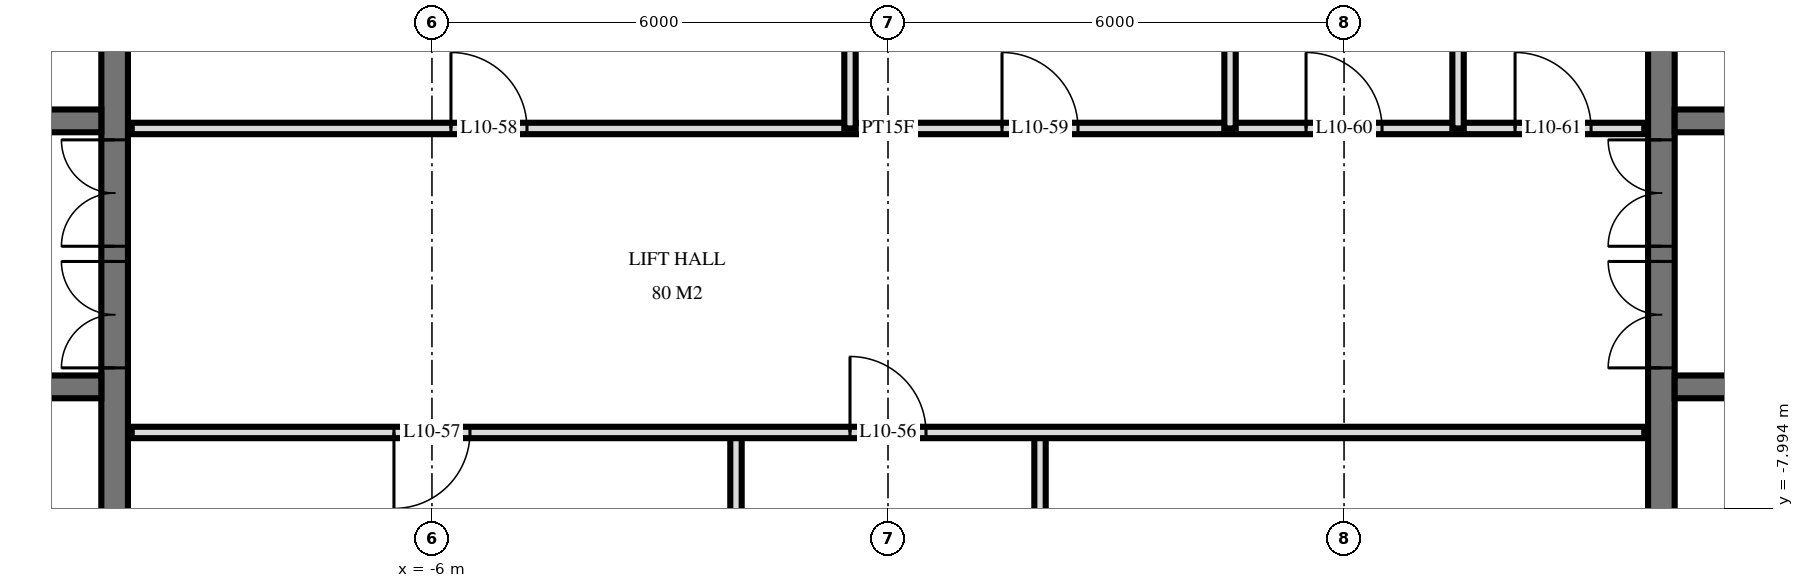
"""IFC4 building model, lengths in metres.
Left out: names, types, materials, properties, quantities, classifications, styles, units other than length and angle.
Written with IfcOpenShell. Run it as: python <this file> out.ifc"""

import sys

from ifc_helpers import new_model, si_unit, direction, frame, frame_2d, origin, place, context, subcontext, project, spatial, rectangle, extrude, element, fill, save


model = new_model("IFC4")
c1 = context("Model", 3, precision=1e-05, world=origin(), true_north=direction((0.0, 1.0)))
c2 = subcontext(c1, "Body", "Model", "MODEL_VIEW")
j1 = project(units=[si_unit("LENGTHUNIT", "METRE"), si_unit("PLANEANGLEUNIT", "RADIAN")], contexts=[c1])
p1 = place(None, origin())
s1 = spatial("IfcSite", under=j1, at=p1, CompositionType="ELEMENT")
p2 = place(p1, origin())
s2 = spatial("IfcBuilding", under=s1, at=p2, CompositionType="ELEMENT")
p3 = place(p2, frame((0.0, 0.0, 45.6)))
s3 = spatial("IfcBuildingStorey", under=s2, at=p3, CompositionType="ELEMENT", Elevation=45.6)
p4 = place(p3, frame((-10.175, -14.55, 0.0), z_axis=(0.0, 0.0, 1.0), x_axis=(0.0, 1.0, 0.0)))
e1 = element("IfcWall", 1, at=p4, inside=s3, PredefinedType="SHEAR", context=c2, shape_type="SweptSolid", body=[
    extrude(rectangle(XDim=14.1, YDim=0.35, at=frame_2d((7.05, 0.0))), origin(), (0.0, 0.0, 1.0), 3.6),
])
p5 = place(p4, frame((8.4, 0.0, 0.0)))
e2 = element("IfcOpeningElement", 2, at=p5, cuts=e1, PredefinedType="OPENING", context=c2, shape_type="SweptSolid", body=[
    extrude(rectangle(XDim=1.4, YDim=2.4, at=frame_2d((0.7, 1.2))), frame((0.0, 0.185, 0.0), z_axis=(0.0, -1.0, 0.0), x_axis=(1.0, 0.0, 0.0)), (0.0, 0.0, 1.0), 0.37),
])
p6 = place(p4, frame((10.0, 0.0, 0.0)))
e3 = element("IfcOpeningElement", 3, at=p6, cuts=e1, PredefinedType="OPENING", context=c2, shape_type="SweptSolid", body=[
    extrude(rectangle(XDim=1.4, YDim=2.4, at=frame_2d((0.7, 1.2))), frame((0.0, 0.185, 0.0), z_axis=(0.0, -1.0, 0.0), x_axis=(1.0, 0.0, 0.0)), (0.0, 0.0, 1.0), 0.37),
])
p7 = place(p4, frame((4.0, 0.0, 0.0)))
e4 = element("IfcOpeningElement", 4, at=p7, cuts=e1, PredefinedType="OPENING", context=c2, shape_type="SweptSolid", body=[
    extrude(rectangle(XDim=1.2, YDim=2.1, at=frame_2d((0.6, 1.05))), frame((0.0, 0.185, 0.0), z_axis=(0.0, -1.0, 0.0), x_axis=(1.0, 0.0, 0.0)), (0.0, 0.0, 1.0), 0.37),
])
p8 = place(p3, frame((-29.05, -2.9, 0.0), z_axis=(0.0, 0.0, 1.0), x_axis=(1.0, 0.0, 0.0)))
e5 = element("IfcWall", 5, at=p8, inside=s3, PredefinedType="SHEAR", context=c2, shape_type="SweptSolid", body=[
    extrude(rectangle(XDim=18.7, YDim=0.3, at=frame_2d((9.35, 0.0))), origin(), (0.0, 0.0, 1.0), 3.6),
])
p9 = place(p8, frame((2.95, 0.0, 0.0)))
e6 = element("IfcOpeningElement", 6, at=p9, cuts=e5, PredefinedType="OPENING", context=c2, shape_type="SweptSolid", body=[
    extrude(rectangle(XDim=1.1, YDim=2.1, at=frame_2d((0.55, 1.05))), frame((0.0, 0.16, 0.0), z_axis=(0.0, -1.0, 0.0), x_axis=(1.0, 0.0, 0.0)), (0.0, 0.0, 1.0), 0.32),
])
p10 = place(p8, frame((0.55, 0.0, 0.0)))
e7 = element("IfcOpeningElement", 7, at=p10, cuts=e5, PredefinedType="OPENING", context=c2, shape_type="SweptSolid", body=[
    extrude(rectangle(XDim=1.1, YDim=2.1, at=frame_2d((0.55, 1.05))), frame((0.0, 0.16, 0.0), z_axis=(0.0, -1.0, 0.0), x_axis=(1.0, 0.0, 0.0)), (0.0, 0.0, 1.0), 0.32),
])
p11 = place(p8, frame((10.9, 0.0, 0.0)))
e8 = element("IfcOpeningElement", 8, at=p11, cuts=e5, PredefinedType="OPENING", context=c2, shape_type="SweptSolid", body=[
    extrude(rectangle(XDim=0.9, YDim=2.1, at=frame_2d((0.45, 1.05))), frame((0.0, 0.16, 0.0), z_axis=(0.0, -1.0, 0.0), x_axis=(1.0, 0.0, 0.0)), (0.0, 0.0, 1.0), 0.32),
])
p12 = place(p8, frame((16.85, 0.0, 0.0)))
e9 = element("IfcOpeningElement", 9, at=p12, cuts=e5, PredefinedType="OPENING", context=c2, shape_type="SweptSolid", body=[
    extrude(rectangle(XDim=1.0, YDim=2.1, at=frame_2d((0.5, 1.05))), frame((0.0, 0.16, 0.0), z_axis=(0.0, -1.0, 0.0), x_axis=(1.0, 0.0, 0.0)), (0.0, 0.0, 1.0), 0.32),
])
p13 = place(p8, frame((14.312, 0.0, 0.0)))
e10 = element("IfcOpeningElement", 10, at=p13, cuts=e5, PredefinedType="OPENING", context=c2, shape_type="SweptSolid", body=[
    extrude(rectangle(XDim=1.0, YDim=2.1, at=frame_2d((0.5, 1.05))), frame((0.0, 0.16, 0.0), z_axis=(0.0, -1.0, 0.0), x_axis=(1.0, 0.0, 0.0)), (0.0, 0.0, 1.0), 0.32),
])
p14 = place(p8, frame((12.887, 0.0, 0.0)))
e11 = element("IfcOpeningElement", 11, at=p14, cuts=e5, PredefinedType="OPENING", context=c2, shape_type="SweptSolid", body=[
    extrude(rectangle(XDim=1.0, YDim=2.1, at=frame_2d((0.5, 1.05))), frame((0.0, 0.16, 0.0), z_axis=(0.0, -1.0, 0.0), x_axis=(1.0, 0.0, 0.0)), (0.0, 0.0, 1.0), 0.32),
])
p15 = place(p8, frame((5.6, 0.0, 0.0)))
e12 = element("IfcOpeningElement", 12, at=p15, cuts=e5, PredefinedType="OPENING", context=c2, shape_type="SweptSolid", body=[
    extrude(rectangle(XDim=1.0, YDim=2.1, at=frame_2d((0.5, 1.05))), frame((0.0, 0.16, 0.0), z_axis=(0.0, -1.0, 0.0), x_axis=(1.0, 0.0, 0.0)), (0.0, 0.0, 1.0), 0.32),
])
p16 = place(p3, frame((-29.05, -6.4, 0.0), z_axis=(0.0, 0.0, 1.0), x_axis=(1.0, 0.0, 0.0)))
e13 = element("IfcWall", 13, at=p16, inside=s3, PredefinedType="SHEAR", context=c2, shape_type="SweptSolid", body=[
    extrude(rectangle(XDim=18.7, YDim=0.3, at=frame_2d((9.35, 0.0))), origin(), (0.0, 0.0, 1.0), 3.6),
])
p17 = place(p16, frame((2.95, 0.0, 0.0)))
e14 = element("IfcOpeningElement", 14, at=p17, cuts=e13, PredefinedType="OPENING", context=c2, shape_type="SweptSolid", body=[
    extrude(rectangle(XDim=1.1, YDim=2.1, at=frame_2d((0.55, 1.05))), frame((0.0, 0.16, 0.0), z_axis=(0.0, -1.0, 0.0), x_axis=(1.0, 0.0, 0.0)), (0.0, 0.0, 1.0), 0.32),
])
p18 = place(p16, frame((0.55, 0.0, 0.0)))
e15 = element("IfcOpeningElement", 15, at=p18, cuts=e13, PredefinedType="OPENING", context=c2, shape_type="SweptSolid", body=[
    extrude(rectangle(XDim=1.1, YDim=2.1, at=frame_2d((0.55, 1.05))), frame((0.0, 0.16, 0.0), z_axis=(0.0, -1.0, 0.0), x_axis=(1.0, 0.0, 0.0)), (0.0, 0.0, 1.0), 0.32),
])
p19 = place(p16, frame((10.8, 0.0, 0.0)))
e16 = element("IfcOpeningElement", 16, at=p19, cuts=e13, PredefinedType="OPENING", context=c2, shape_type="SweptSolid", body=[
    extrude(rectangle(XDim=1.1, YDim=2.1, at=frame_2d((0.55, 1.05))), frame((0.0, 0.16, 0.0), z_axis=(0.0, -1.0, 0.0), x_axis=(1.0, 0.0, 0.0)), (0.0, 0.0, 1.0), 0.32),
])
p20 = place(p16, frame((5.6, 0.0, 0.0)))
e17 = element("IfcOpeningElement", 17, at=p20, cuts=e13, PredefinedType="OPENING", context=c2, shape_type="SweptSolid", body=[
    extrude(rectangle(XDim=1.0, YDim=2.1, at=frame_2d((0.5, 1.05))), frame((0.0, 0.16, 0.0), z_axis=(0.0, -1.0, 0.0), x_axis=(1.0, 0.0, 0.0)), (0.0, 0.0, 1.0), 0.32),
])
p21 = place(p3, frame((10.175, -14.55, 0.0), z_axis=(0.0, 0.0, 1.0), x_axis=(0.0, 1.0, 0.0)))
e18 = element("IfcWall", 18, at=p21, inside=s3, PredefinedType="SHEAR", context=c2, shape_type="SweptSolid", body=[
    extrude(rectangle(XDim=14.1, YDim=0.35, at=frame_2d((7.05, 0.0))), origin(), (0.0, 0.0, 1.0), 3.6),
])
p22 = place(p21, frame((8.4, 0.0, 0.0)))
e19 = element("IfcOpeningElement", 19, at=p22, cuts=e18, PredefinedType="OPENING", context=c2, shape_type="SweptSolid", body=[
    extrude(rectangle(XDim=1.4, YDim=2.4, at=frame_2d((0.7, 1.2))), frame((0.0, 0.185, 0.0), z_axis=(0.0, -1.0, 0.0), x_axis=(1.0, 0.0, 0.0)), (0.0, 0.0, 1.0), 0.37),
])
p23 = place(p21, frame((10.0, 0.0, 0.0)))
e20 = element("IfcOpeningElement", 20, at=p23, cuts=e18, PredefinedType="OPENING", context=c2, shape_type="SweptSolid", body=[
    extrude(rectangle(XDim=1.4, YDim=2.4, at=frame_2d((0.7, 1.2))), frame((0.0, 0.185, 0.0), z_axis=(0.0, -1.0, 0.0), x_axis=(1.0, 0.0, 0.0)), (0.0, 0.0, 1.0), 0.37),
])
p24 = place(p21, frame((4.0, 0.0, 0.0)))
e21 = element("IfcOpeningElement", 21, at=p24, cuts=e18, PredefinedType="OPENING", context=c2, shape_type="SweptSolid", body=[
    extrude(rectangle(XDim=1.2, YDim=2.1, at=frame_2d((0.6, 1.05))), frame((0.0, 0.185, 0.0), z_axis=(0.0, -1.0, 0.0), x_axis=(1.0, 0.0, 0.0)), (0.0, 0.0, 1.0), 0.37),
])
p25 = place(p3, frame((10.35, -2.9, 0.0), z_axis=(0.0, 0.0, 1.0), x_axis=(1.0, 0.0, 0.0)))
e22 = element("IfcWall", 22, at=p25, inside=s3, PredefinedType="SHEAR", context=c2, shape_type="SweptSolid", body=[
    extrude(rectangle(XDim=18.7, YDim=0.3, at=frame_2d((9.35, 0.0))), origin(), (0.0, 0.0, 1.0), 3.6),
])
p26 = place(p25, frame((14.65, 0.0, 0.0)))
e23 = element("IfcOpeningElement", 23, at=p26, cuts=e22, PredefinedType="OPENING", context=c2, shape_type="SweptSolid", body=[
    extrude(rectangle(XDim=1.1, YDim=2.1, at=frame_2d((0.55, 1.05))), frame((0.0, 0.16, 0.0), z_axis=(0.0, -1.0, 0.0), x_axis=(1.0, 0.0, 0.0)), (0.0, 0.0, 1.0), 0.32),
])
p27 = place(p25, frame((17.05, 0.0, 0.0)))
e24 = element("IfcOpeningElement", 24, at=p27, cuts=e22, PredefinedType="OPENING", context=c2, shape_type="SweptSolid", body=[
    extrude(rectangle(XDim=1.1, YDim=2.1, at=frame_2d((0.55, 1.05))), frame((0.0, 0.16, 0.0), z_axis=(0.0, -1.0, 0.0), x_axis=(1.0, 0.0, 0.0)), (0.0, 0.0, 1.0), 0.32),
])
p28 = place(p25, frame((6.9, 0.0, 0.0)))
e25 = element("IfcOpeningElement", 25, at=p28, cuts=e22, PredefinedType="OPENING", context=c2, shape_type="SweptSolid", body=[
    extrude(rectangle(XDim=0.9, YDim=2.1, at=frame_2d((0.45, 1.05))), frame((0.0, 0.16, 0.0), z_axis=(0.0, -1.0, 0.0), x_axis=(1.0, 0.0, 0.0)), (0.0, 0.0, 1.0), 0.32),
])
p29 = place(p25, frame((0.85, 0.0, 0.0)))
e26 = element("IfcOpeningElement", 26, at=p29, cuts=e22, PredefinedType="OPENING", context=c2, shape_type="SweptSolid", body=[
    extrude(rectangle(XDim=1.0, YDim=2.1, at=frame_2d((0.5, 1.05))), frame((0.0, 0.16, 0.0), z_axis=(0.0, -1.0, 0.0), x_axis=(1.0, 0.0, 0.0)), (0.0, 0.0, 1.0), 0.32),
])
p30 = place(p25, frame((3.387, 0.0, 0.0)))
e27 = element("IfcOpeningElement", 27, at=p30, cuts=e22, PredefinedType="OPENING", context=c2, shape_type="SweptSolid", body=[
    extrude(rectangle(XDim=1.0, YDim=2.1, at=frame_2d((0.5, 1.05))), frame((0.0, 0.16, 0.0), z_axis=(0.0, -1.0, 0.0), x_axis=(1.0, 0.0, 0.0)), (0.0, 0.0, 1.0), 0.32),
])
p31 = place(p25, frame((4.812, 0.0, 0.0)))
e28 = element("IfcOpeningElement", 28, at=p31, cuts=e22, PredefinedType="OPENING", context=c2, shape_type="SweptSolid", body=[
    extrude(rectangle(XDim=1.0, YDim=2.1, at=frame_2d((0.5, 1.05))), frame((0.0, 0.16, 0.0), z_axis=(0.0, -1.0, 0.0), x_axis=(1.0, 0.0, 0.0)), (0.0, 0.0, 1.0), 0.32),
])
p32 = place(p25, frame((12.1, 0.0, 0.0)))
e29 = element("IfcOpeningElement", 29, at=p32, cuts=e22, PredefinedType="OPENING", context=c2, shape_type="SweptSolid", body=[
    extrude(rectangle(XDim=1.0, YDim=2.1, at=frame_2d((0.5, 1.05))), frame((0.0, 0.16, 0.0), z_axis=(0.0, -1.0, 0.0), x_axis=(1.0, 0.0, 0.0)), (0.0, 0.0, 1.0), 0.32),
])
p33 = place(p3, frame((10.35, -6.4, 0.0), z_axis=(0.0, 0.0, 1.0), x_axis=(1.0, 0.0, 0.0)))
e30 = element("IfcWall", 30, at=p33, inside=s3, PredefinedType="SHEAR", context=c2, shape_type="SweptSolid", body=[
    extrude(rectangle(XDim=18.7, YDim=0.3, at=frame_2d((9.35, 0.0))), origin(), (0.0, 0.0, 1.0), 3.6),
])
p34 = place(p33, frame((14.65, 0.0, 0.0)))
e31 = element("IfcOpeningElement", 31, at=p34, cuts=e30, PredefinedType="OPENING", context=c2, shape_type="SweptSolid", body=[
    extrude(rectangle(XDim=1.1, YDim=2.1, at=frame_2d((0.55, 1.05))), frame((0.0, 0.16, 0.0), z_axis=(0.0, -1.0, 0.0), x_axis=(1.0, 0.0, 0.0)), (0.0, 0.0, 1.0), 0.32),
])
p35 = place(p33, frame((17.05, 0.0, 0.0)))
e32 = element("IfcOpeningElement", 32, at=p35, cuts=e30, PredefinedType="OPENING", context=c2, shape_type="SweptSolid", body=[
    extrude(rectangle(XDim=1.1, YDim=2.1, at=frame_2d((0.55, 1.05))), frame((0.0, 0.16, 0.0), z_axis=(0.0, -1.0, 0.0), x_axis=(1.0, 0.0, 0.0)), (0.0, 0.0, 1.0), 0.32),
])
p36 = place(p33, frame((6.8, 0.0, 0.0)))
e33 = element("IfcOpeningElement", 33, at=p36, cuts=e30, PredefinedType="OPENING", context=c2, shape_type="SweptSolid", body=[
    extrude(rectangle(XDim=1.1, YDim=2.1, at=frame_2d((0.55, 1.05))), frame((0.0, 0.16, 0.0), z_axis=(0.0, -1.0, 0.0), x_axis=(1.0, 0.0, 0.0)), (0.0, 0.0, 1.0), 0.32),
])
p37 = place(p33, frame((12.1, 0.0, 0.0)))
e34 = element("IfcOpeningElement", 34, at=p37, cuts=e30, PredefinedType="OPENING", context=c2, shape_type="SweptSolid", body=[
    extrude(rectangle(XDim=1.0, YDim=2.1, at=frame_2d((0.5, 1.05))), frame((0.0, 0.16, 0.0), z_axis=(0.0, -1.0, 0.0), x_axis=(1.0, 0.0, 0.0)), (0.0, 0.0, 1.0), 0.32),
])
for number, where, z_axis, x_axis in (
    (35, (7.5, -3.0, 0.0), (0.0, 0.0, 1.0), (0.0, 1.0, 0.0)),
    (36, (4.5, -3.0, 0.0), (0.0, 0.0, 1.0), (0.0, 1.0, 0.0)),
):
    element("IfcWall", number, at=place(p3, frame(where, z_axis=z_axis, x_axis=x_axis)), inside=s3, PredefinedType="PLUMBINGWALL", context=c2, shape_type="SweptSolid", body=[
        extrude(rectangle(XDim=4.02, YDim=0.15, at=frame_2d((2.01, 0.0))), origin(), (0.0, 0.0, 1.0), 3.32),
    ])
p38 = place(p3, frame((2.0, -11.0, 0.0), z_axis=(0.0, 0.0, 1.0), x_axis=(0.0, 1.0, 0.0)))
e37 = element("IfcWall", 37, at=p38, inside=s3, PredefinedType="PARTITIONING", context=c2, shape_type="SweptSolid", body=[
    extrude(rectangle(XDim=4.0, YDim=0.15, at=frame_2d((2.0, 0.0))), origin(), (0.0, 0.0, 1.0), 3.32),
])
p39 = place(p3, frame((-0.5, -3.0, 0.0), z_axis=(0.0, 0.0, 1.0), x_axis=(0.0, 1.0, 0.0)))
e38 = element("IfcWall", 38, at=p39, inside=s3, PredefinedType="PARTITIONING", context=c2, shape_type="SweptSolid", body=[
    extrude(rectangle(XDim=4.02, YDim=0.15, at=frame_2d((2.01, 0.0))), origin(), (0.0, 0.0, 1.0), 3.32),
])
p40 = place(p3, frame((-2.0, -11.0, 0.0), z_axis=(0.0, 0.0, 1.0), x_axis=(0.0, 1.0, 0.0)))
e39 = element("IfcWall", 39, at=p40, inside=s3, PredefinedType="PARTITIONING", context=c2, shape_type="SweptSolid", body=[
    extrude(rectangle(XDim=4.0, YDim=0.15, at=frame_2d((2.0, 0.0))), origin(), (0.0, 0.0, 1.0), 3.32),
])
p41 = place(p3, frame((-9.95, -7.0, 0.0), z_axis=(0.0, 0.0, 1.0), x_axis=(1.0, 0.0, 0.0)))
e40 = element("IfcWall", 40, at=p41, inside=s3, PredefinedType="PARTITIONING", context=c2, shape_type="SweptSolid", body=[
    extrude(rectangle(XDim=19.9, YDim=0.15, at=frame_2d((9.95, 0.0))), origin(), (0.0, 0.0, 1.0), 3.32),
])
p42 = place(p41, frame((9.45, 0.0, 0.0)))
e41 = element("IfcOpeningElement", 41, at=p42, cuts=e40, PredefinedType="OPENING", context=c2, shape_type="SweptSolid", body=[
    extrude(rectangle(XDim=1.0, YDim=2.1, at=frame_2d((0.5, 1.05))), frame((0.0, 0.085, 0.0), z_axis=(0.0, -1.0, 0.0), x_axis=(1.0, 0.0, 0.0)), (0.0, 0.0, 1.0), 0.17),
])
p43 = place(p41, frame((3.45, 0.0, 0.0)))
e42 = element("IfcOpeningElement", 42, at=p43, cuts=e40, PredefinedType="OPENING", context=c2, shape_type="SweptSolid", body=[
    extrude(rectangle(XDim=1.0, YDim=2.1, at=frame_2d((0.5, 1.05))), frame((0.0, 0.085, 0.0), z_axis=(0.0, -1.0, 0.0), x_axis=(1.0, 0.0, 0.0)), (0.0, 0.0, 1.0), 0.17),
])
p44 = place(p3, frame((-9.95, -3.0, 0.0), z_axis=(0.0, 0.0, 1.0), x_axis=(1.0, 0.0, 0.0)))
e43 = element("IfcWall", 43, at=p44, inside=s3, PredefinedType="PARTITIONING", context=c2, shape_type="SweptSolid", body=[
    extrude(rectangle(XDim=19.9, YDim=0.15, at=frame_2d((9.95, 0.0))), origin(), (0.0, 0.0, 1.0), 3.32),
])
p45 = place(p44, frame((4.2, 0.0, 0.0)))
e44 = element("IfcOpeningElement", 44, at=p45, cuts=e43, PredefinedType="OPENING", context=c2, shape_type="SweptSolid", body=[
    extrude(rectangle(XDim=1.0, YDim=2.1, at=frame_2d((0.5, 1.05))), frame((0.0, 0.085, 0.0), z_axis=(0.0, -1.0, 0.0), x_axis=(1.0, 0.0, 0.0)), (0.0, 0.0, 1.0), 0.17),
])
p46 = place(p44, frame((11.45, 0.0, 0.0)))
e45 = element("IfcOpeningElement", 45, at=p46, cuts=e43, PredefinedType="OPENING", context=c2, shape_type="SweptSolid", body=[
    extrude(rectangle(XDim=1.0, YDim=2.1, at=frame_2d((0.5, 1.05))), frame((0.0, 0.085, 0.0), z_axis=(0.0, -1.0, 0.0), x_axis=(1.0, 0.0, 0.0)), (0.0, 0.0, 1.0), 0.17),
])
p47 = place(p44, frame((15.45, 0.0, 0.0)))
e46 = element("IfcOpeningElement", 46, at=p47, cuts=e43, PredefinedType="OPENING", context=c2, shape_type="SweptSolid", body=[
    extrude(rectangle(XDim=1.0, YDim=2.1, at=frame_2d((0.5, 1.05))), frame((0.0, 0.085, 0.0), z_axis=(0.0, -1.0, 0.0), x_axis=(1.0, 0.0, 0.0)), (0.0, 0.0, 1.0), 0.17),
])
p48 = place(p44, frame((18.2, 0.0, 0.0)))
e47 = element("IfcOpeningElement", 47, at=p48, cuts=e43, PredefinedType="OPENING", context=c2, shape_type="SweptSolid", body=[
    extrude(rectangle(XDim=1.0, YDim=2.1, at=frame_2d((0.5, 1.05))), frame((0.0, 0.085, 0.0), z_axis=(0.0, -1.0, 0.0), x_axis=(1.0, 0.0, 0.0)), (0.0, 0.0, 1.0), 0.17),
])
p49 = place(p5, origin())
e48 = element("IfcDoor", 48, at=p49, inside=s3, OperationType="DOUBLE_DOOR_SINGLE_SWING", PredefinedType="DOOR", context=c2, shape_type="SweptSolid", body=[
    extrude(rectangle(XDim=1.4, YDim=2.4, at=frame_2d((0.7, 1.2))), frame((0.0, 0.025, 0.0), z_axis=(0.0, -1.0, 0.0), x_axis=(1.0, 0.0, 0.0)), (0.0, 0.0, 1.0), 0.05),
])
fill(e2, e48)
p50 = place(p6, origin())
e49 = element("IfcDoor", 49, at=p50, inside=s3, OperationType="DOUBLE_DOOR_SINGLE_SWING", PredefinedType="DOOR", context=c2, shape_type="SweptSolid", body=[
    extrude(rectangle(XDim=1.4, YDim=2.4, at=frame_2d((0.7, 1.2))), frame((0.0, 0.025, 0.0), z_axis=(0.0, -1.0, 0.0), x_axis=(1.0, 0.0, 0.0)), (0.0, 0.0, 1.0), 0.05),
])
fill(e3, e49)
p51 = place(p22, origin())
e50 = element("IfcDoor", 50, at=p51, inside=s3, OperationType="DOUBLE_DOOR_SINGLE_SWING", PredefinedType="DOOR", context=c2, shape_type="SweptSolid", body=[
    extrude(rectangle(XDim=1.4, YDim=2.4, at=frame_2d((0.7, 1.2))), frame((0.0, 0.025, 0.0), z_axis=(0.0, -1.0, 0.0), x_axis=(1.0, 0.0, 0.0)), (0.0, 0.0, 1.0), 0.05),
])
fill(e19, e50)
p52 = place(p23, origin())
e51 = element("IfcDoor", 51, at=p52, inside=s3, OperationType="DOUBLE_DOOR_SINGLE_SWING", PredefinedType="DOOR", context=c2, shape_type="SweptSolid", body=[
    extrude(rectangle(XDim=1.4, YDim=2.4, at=frame_2d((0.7, 1.2))), frame((0.0, 0.025, 0.0), z_axis=(0.0, -1.0, 0.0), x_axis=(1.0, 0.0, 0.0)), (0.0, 0.0, 1.0), 0.05),
])
fill(e20, e51)
p53 = place(p42, origin())
e52 = element("IfcDoor", 52, at=p53, inside=s3, OperationType="SINGLE_SWING_RIGHT", PredefinedType="DOOR", context=c2, shape_type="SweptSolid", body=[
    extrude(rectangle(XDim=1.0, YDim=2.1, at=frame_2d((0.5, 1.05))), frame((0.0, 0.025, 0.0), z_axis=(0.0, -1.0, 0.0), x_axis=(1.0, 0.0, 0.0)), (0.0, 0.0, 1.0), 0.05),
])
fill(e41, e52)
p54 = place(p43, frame((0.5, 0.0, 0.0), z_axis=(0.0, 0.0, 1.0), x_axis=(-1.0, 0.0, 0.0)))
e53 = element("IfcDoor", 53, at=p54, inside=s3, OperationType="SINGLE_SWING_LEFT", PredefinedType="DOOR", context=c2, shape_type="SweptSolid", body=[
    extrude(rectangle(XDim=1.0, YDim=2.1, at=frame_2d((0.0, 1.05))), frame((0.0, -0.025, 0.0), z_axis=(0.0, 1.0, 0.0), x_axis=(-1.0, 0.0, 0.0)), (0.0, 0.0, 1.0), 0.05),
])
fill(e42, e53)
p55 = place(p45, origin())
e54 = element("IfcDoor", 54, at=p55, inside=s3, OperationType="SINGLE_SWING_RIGHT", PredefinedType="DOOR", context=c2, shape_type="SweptSolid", body=[
    extrude(rectangle(XDim=1.0, YDim=2.1, at=frame_2d((0.5, 1.05))), frame((0.0, 0.025, 0.0), z_axis=(0.0, -1.0, 0.0), x_axis=(1.0, 0.0, 0.0)), (0.0, 0.0, 1.0), 0.05),
])
fill(e44, e54)
p56 = place(p46, origin())
e55 = element("IfcDoor", 55, at=p56, inside=s3, OperationType="SINGLE_SWING_RIGHT", PredefinedType="DOOR", context=c2, shape_type="SweptSolid", body=[
    extrude(rectangle(XDim=1.0, YDim=2.1, at=frame_2d((0.5, 1.05))), frame((0.0, 0.025, 0.0), z_axis=(0.0, -1.0, 0.0), x_axis=(1.0, 0.0, 0.0)), (0.0, 0.0, 1.0), 0.05),
])
fill(e45, e55)
p57 = place(p47, origin())
e56 = element("IfcDoor", 56, at=p57, inside=s3, OperationType="SINGLE_SWING_RIGHT", PredefinedType="DOOR", context=c2, shape_type="SweptSolid", body=[
    extrude(rectangle(XDim=1.0, YDim=2.1, at=frame_2d((0.5, 1.05))), frame((0.0, 0.025, 0.0), z_axis=(0.0, -1.0, 0.0), x_axis=(1.0, 0.0, 0.0)), (0.0, 0.0, 1.0), 0.05),
])
fill(e46, e56)
p58 = place(p48, origin())
e57 = element("IfcDoor", 57, at=p58, inside=s3, OperationType="SINGLE_SWING_RIGHT", PredefinedType="DOOR", context=c2, shape_type="SweptSolid", body=[
    extrude(rectangle(XDim=1.0, YDim=2.1, at=frame_2d((0.5, 1.05))), frame((0.0, 0.025, 0.0), z_axis=(0.0, -1.0, 0.0), x_axis=(1.0, 0.0, 0.0)), (0.0, 0.0, 1.0), 0.05),
])
fill(e47, e57)
save(model, sys.argv[1])
